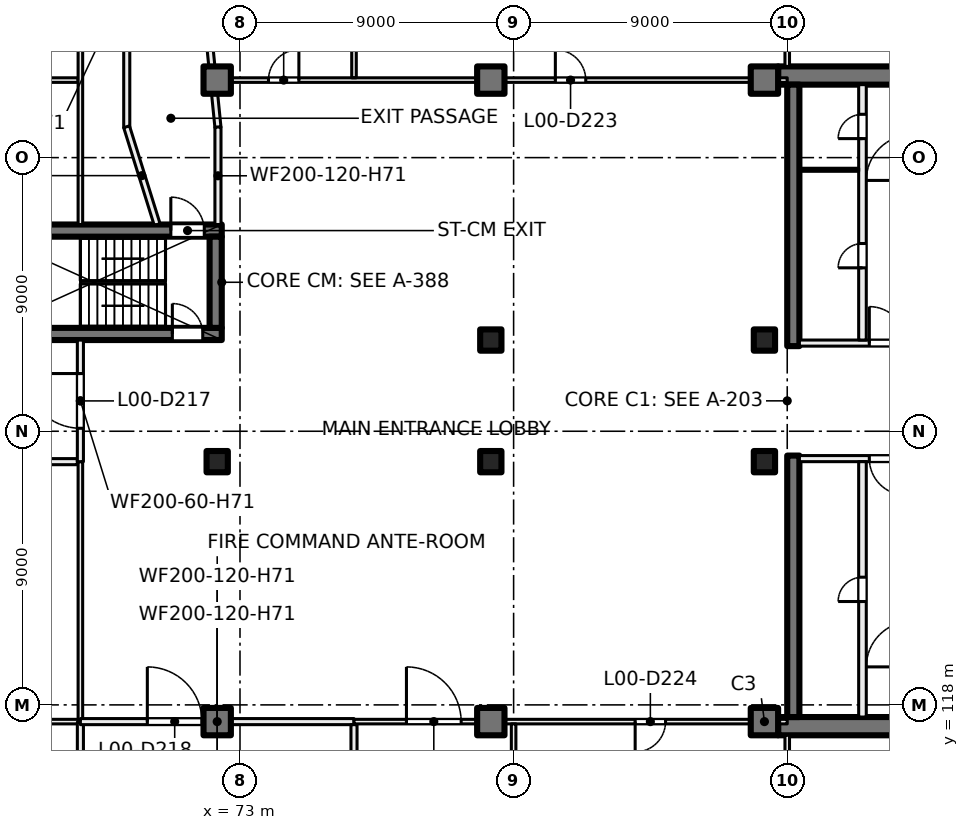
"""IFC4 building model, lengths in metres.
Left out: names, types, materials, properties, quantities, classifications, styles, units other than length and angle.
Written with IfcOpenShell. Run it as: python <this file> out.ifc"""

import sys

from ifc_helpers import new_model, si_unit, direction, frame, frame_2d, origin, origin_2d, place, context, subcontext, project, spatial, rectangle, extrude, element, fill, save


model = new_model("IFC4")
c1 = context("Model", 3, precision=1e-05, world=origin(), true_north=direction((0.0, 1.0)))
c2 = subcontext(c1, "Body", "Model", "MODEL_VIEW")
j1 = project(units=[si_unit("LENGTHUNIT", "METRE"), si_unit("PLANEANGLEUNIT", "RADIAN")], contexts=[c1])
p1 = place(None, origin())
s1 = spatial("IfcSite", under=j1, at=p1, CompositionType="ELEMENT")
p2 = place(p1, origin())
s2 = spatial("IfcBuilding", under=s1, at=p2, CompositionType="ELEMENT")
p3 = place(p2, origin())
s3 = spatial("IfcBuildingStorey", under=s2, at=p3, CompositionType="ELEMENT", Elevation=0.0)
for number, where, z_axis, x_axis in (
    (1, (81.25, 130.0, 0.0), (0.0, 0.0, 1.0), (1.0, 0.0, 0.0)),
    (2, (90.25, 130.0, 0.0), (0.0, 0.0, 1.0), (1.0, 0.0, 0.0)),
    (3, (72.25, 126.0, 0.0), (0.0, 0.0, 1.0), (1.0, 0.0, 0.0)),
    (4, (81.25, 126.0, 0.0), (0.0, 0.0, 1.0), (1.0, 0.0, 0.0)),
    (5, (90.25, 126.0, 0.0), (0.0, 0.0, 1.0), (1.0, 0.0, 0.0)),
):
    element("IfcColumn", number, at=place(p3, frame(where, z_axis=z_axis, x_axis=x_axis)), inside=s3, PredefinedType="COLUMN", context=c2, shape_type="SweptSolid", body=[
        extrude(rectangle(XDim=0.7, YDim=0.7, at=origin_2d()), origin(), (0.0, 0.0, 1.0), 7.5),
    ])
for number, where, z_axis, x_axis in (
    (6, (72.25, 138.55, 0.0), (0.0, 0.0, 1.0), (1.0, 0.0, 0.0)),
    (7, (81.25, 138.55, 0.0), (0.0, 0.0, 1.0), (1.0, 0.0, 0.0)),
    (8, (90.25, 138.55, 0.0), (0.0, 0.0, 1.0), (1.0, 0.0, 0.0)),
    (9, (72.25, 117.45, 0.0), (0.0, 0.0, 1.0), (1.0, 0.0, 0.0)),
    (10, (81.25, 117.45, 0.0), (0.0, 0.0, 1.0), (1.0, 0.0, 0.0)),
    (11, (90.25, 117.45, 0.0), (0.0, 0.0, 1.0), (1.0, 0.0, 0.0)),
):
    element("IfcColumn", number, at=place(p3, frame(where, z_axis=z_axis, x_axis=x_axis)), inside=s3, PredefinedType="COLUMN", context=c2, shape_type="SweptSolid", body=[
        extrude(rectangle(XDim=0.9, YDim=0.9, at=origin_2d()), origin(), (0.0, 0.0, 1.0), 7.5),
    ])
for number, where, z_axis, x_axis in (
    (12, (99.6, 138.7, 0.0), (0.0, 0.0, 1.0), (-1.0, 0.0, 0.0)),
    (13, (99.6, 117.3, 0.0), (0.0, 0.0, 1.0), (-1.0, 0.0, 0.0)),
):
    element("IfcWall", number, at=place(p3, frame(where, z_axis=z_axis, x_axis=x_axis)), inside=s3, PredefinedType="SHEAR", context=c2, shape_type="SweptSolid", body=[
        extrude(rectangle(XDim=8.9, YDim=0.6, at=frame_2d((4.45, 0.0))), origin(), (0.0, 0.0, 1.0), 7.5),
    ])
for number, where, z_axis, x_axis in (
    (14, (91.2, 138.4, 0.0), (0.0, 0.0, 1.0), (0.0, -1.0, 0.0)),
    (15, (91.2, 126.2, 0.0), (0.0, 0.0, 1.0), (0.0, -1.0, 0.0)),
):
    element("IfcWall", number, at=place(p3, frame(where, z_axis=z_axis, x_axis=x_axis)), inside=s3, PredefinedType="SHEAR", context=c2, shape_type="SweptSolid", body=[
        extrude(rectangle(XDim=8.6, YDim=0.4, at=frame_2d((4.3, 0.0))), origin(), (0.0, 0.0, 1.0), 7.5),
    ])
p4 = place(p3, frame((63.6, 130.2, 0.0), z_axis=(0.0, 0.0, 1.0), x_axis=(1.0, 0.0, 0.0)))
e16 = element("IfcWall", 16, at=p4, inside=s3, PredefinedType="SHEAR", context=c2, shape_type="SweptSolid", body=[
    extrude(rectangle(XDim=8.8, YDim=0.4, at=frame_2d((4.4, 0.0))), origin(), (0.0, 0.0, 1.0), 7.5),
])
p5 = place(p4, frame((7.175, 0.0, 0.0)))
e17 = element("IfcOpeningElement", 17, at=p5, cuts=e16, PredefinedType="OPENING", context=c2, shape_type="SweptSolid", body=[
    extrude(rectangle(XDim=1.0, YDim=2.1, at=frame_2d((0.5, 1.05))), frame((0.0, 0.21, 0.0), z_axis=(0.0, -1.0, 0.0), x_axis=(1.0, 0.0, 0.0)), (0.0, 0.0, 1.0), 0.42),
])
p6 = place(p3, frame((64.0, 133.6, 0.0), z_axis=(0.0, 0.0, 1.0), x_axis=(1.0, 0.0, 0.0)))
e18 = element("IfcWall", 18, at=p6, inside=s3, PredefinedType="SHEAR", context=c2, shape_type="SweptSolid", body=[
    extrude(rectangle(XDim=8.4, YDim=0.4, at=frame_2d((4.2, 0.0))), origin(), (0.0, 0.0, 1.0), 7.5),
])
p7 = place(p6, frame((6.725, 0.0, 0.0)))
e19 = element("IfcOpeningElement", 19, at=p7, cuts=e18, PredefinedType="OPENING", context=c2, shape_type="SweptSolid", body=[
    extrude(rectangle(XDim=1.1, YDim=2.1, at=frame_2d((0.55, 1.05))), frame((0.0, 0.21, 0.0), z_axis=(0.0, -1.0, 0.0), x_axis=(1.0, 0.0, 0.0)), (0.0, 0.0, 1.0), 0.42),
])
p8 = place(p3, frame((72.2, 130.4, 0.0), z_axis=(0.0, 0.0, 1.0), x_axis=(0.0, 1.0, 0.0)))
e20 = element("IfcWall", 20, at=p8, inside=s3, PredefinedType="SHEAR", context=c2, shape_type="SweptSolid", body=[
    extrude(rectangle(XDim=3.0, YDim=0.4, at=frame_2d((1.5, 0.0))), origin(), (0.0, 0.0, 1.0), 7.5),
])
p9 = place(p3, frame((95.2, 126.1, 0.0), z_axis=(0.0, 0.0, 1.0), x_axis=(-1.0, 0.0, 0.0)))
e21 = element("IfcWall", 21, at=p9, inside=s3, PredefinedType="PARTITIONING", context=c2, shape_type="SweptSolid", body=[
    extrude(rectangle(XDim=3.8, YDim=0.2, at=frame_2d((1.9, 0.0))), origin(), (0.0, 0.0, 1.0), 7.1),
])
p10 = place(p9, frame((0.3, 0.0, 0.0)))
e22 = element("IfcOpeningElement", 22, at=p10, cuts=e21, PredefinedType="OPENING", context=c2, shape_type="SweptSolid", body=[
    extrude(rectangle(XDim=1.2, YDim=2.1, at=frame_2d((0.6, 1.05))), frame((0.0, 0.11, 0.0), z_axis=(0.0, -1.0, 0.0), x_axis=(1.0, 0.0, 0.0)), (0.0, 0.0, 1.0), 0.22),
])
p11 = place(p3, frame((93.475, 117.6, 0.0), z_axis=(0.0, 0.0, 1.0), x_axis=(0.0, 1.0, 0.0)))
e23 = element("IfcWall", 23, at=p11, inside=s3, PredefinedType="PARTITIONING", context=c2, shape_type="SweptSolid", body=[
    extrude(rectangle(XDim=8.4, YDim=0.25, at=frame_2d((4.2, 0.0))), origin(), (0.0, 0.0, 1.0), 7.1),
])
p12 = place(p11, frame((3.8, 0.0, 0.0)))
e24 = element("IfcOpeningElement", 24, at=p12, cuts=e23, PredefinedType="OPENING", context=c2, shape_type="SweptSolid", body=[
    extrude(rectangle(XDim=0.8, YDim=2.1, at=frame_2d((0.4, 1.05))), frame((0.0, 0.135, 0.0), z_axis=(0.0, -1.0, 0.0), x_axis=(1.0, 0.0, 0.0)), (0.0, 0.0, 1.0), 0.27),
])
p13 = place(p3, frame((91.4, 129.9, 0.0), z_axis=(0.0, 0.0, 1.0), x_axis=(1.0, 0.0, 0.0)))
e25 = element("IfcWall", 25, at=p13, inside=s3, PredefinedType="PARTITIONING", context=c2, shape_type="SweptSolid", body=[
    extrude(rectangle(XDim=3.8, YDim=0.2, at=frame_2d((1.9, 0.0))), origin(), (0.0, 0.0, 1.0), 7.1),
])
p14 = place(p13, frame((2.3, 0.0, 0.0)))
e26 = element("IfcOpeningElement", 26, at=p14, cuts=e25, PredefinedType="OPENING", context=c2, shape_type="SweptSolid", body=[
    extrude(rectangle(XDim=1.2, YDim=2.1, at=frame_2d((0.6, 1.05))), frame((0.0, 0.11, 0.0), z_axis=(0.0, -1.0, 0.0), x_axis=(1.0, 0.0, 0.0)), (0.0, 0.0, 1.0), 0.22),
])
p15 = place(p3, frame((93.475, 130.0, 0.0), z_axis=(0.0, 0.0, 1.0), x_axis=(0.0, 1.0, 0.0)))
e27 = element("IfcWall", 27, at=p15, inside=s3, PredefinedType="PARTITIONING", context=c2, shape_type="SweptSolid", body=[
    extrude(rectangle(XDim=8.4, YDim=0.25, at=frame_2d((4.2, 0.0))), origin(), (0.0, 0.0, 1.0), 7.1),
])
p16 = place(p15, frame((2.375, 0.0, 0.0)))
e28 = element("IfcOpeningElement", 28, at=p16, cuts=e27, PredefinedType="OPENING", context=c2, shape_type="SweptSolid", body=[
    extrude(rectangle(XDim=0.8, YDim=2.1, at=frame_2d((0.4, 1.05))), frame((0.0, 0.135, 0.0), z_axis=(0.0, -1.0, 0.0), x_axis=(1.0, 0.0, 0.0)), (0.0, 0.0, 1.0), 0.27),
])
p17 = place(p15, frame((6.625, 0.0, 0.0)))
e29 = element("IfcOpeningElement", 29, at=p17, cuts=e27, PredefinedType="OPENING", context=c2, shape_type="SweptSolid", body=[
    extrude(rectangle(XDim=0.8, YDim=2.1, at=frame_2d((0.4, 1.05))), frame((0.0, 0.135, 0.0), z_axis=(0.0, -1.0, 0.0), x_axis=(1.0, 0.0, 0.0)), (0.0, 0.0, 1.0), 0.27),
])
p18 = place(p3, frame((91.4, 135.6, 0.0), z_axis=(0.0, 0.0, 1.0), x_axis=(1.0, 0.0, 0.0)))
e30 = element("IfcWall", 30, at=p18, inside=s3, PredefinedType="PARTITIONING", context=c2, shape_type="SweptSolid", body=[
    extrude(rectangle(XDim=1.95, YDim=0.1, at=frame_2d((0.975, 0.0))), origin(), (0.0, 0.0, 1.0), 7.1),
])
p19 = place(p3, frame((49.825, 117.45, 0.0), z_axis=(0.0, 0.0, 1.0), x_axis=(1.0, 0.0, 0.0)))
e31 = element("IfcWall", 31, at=p19, inside=s3, PredefinedType="PARTITIONING", context=c2, shape_type="SweptSolid", body=[
    extrude(rectangle(XDim=17.925, YDim=0.15, at=frame_2d((8.962, 0.0))), origin(), (0.0, 0.0, 1.0), 7.1),
])
p20 = place(p3, frame((67.65, 126.0, 0.0), z_axis=(0.0, 0.0, 1.0), x_axis=(-1.0, 0.0, 0.0)))
e32 = element("IfcWall", 32, at=p20, inside=s3, PredefinedType="PARTITIONING", context=c2, shape_type="SweptSolid", body=[
    extrude(rectangle(XDim=17.8, YDim=0.2, at=frame_2d((8.9, 0.0))), origin(), (0.0, 0.0, 1.0), 7.1),
])
p21 = place(p20, frame((15.148, 0.0, 0.0)))
e33 = element("IfcOpeningElement", 33, at=p21, cuts=e32, PredefinedType="OPENING", context=c2, shape_type="SweptSolid", body=[
    extrude(rectangle(XDim=1.0, YDim=2.1, at=frame_2d((0.5, 1.05))), frame((0.0, 0.11, 0.0), z_axis=(0.0, -1.0, 0.0), x_axis=(1.0, 0.0, 0.0)), (0.0, 0.0, 1.0), 0.22),
])
p22 = place(p20, frame((6.152, 0.0, 0.0)))
e34 = element("IfcOpeningElement", 34, at=p22, cuts=e32, PredefinedType="OPENING", context=c2, shape_type="SweptSolid", body=[
    extrude(rectangle(XDim=1.0, YDim=2.1, at=frame_2d((0.5, 1.05))), frame((0.0, 0.11, 0.0), z_axis=(0.0, -1.0, 0.0), x_axis=(1.0, 0.0, 0.0)), (0.0, 0.0, 1.0), 0.22),
])
p23 = place(p3, frame((54.325, 138.55, 0.0), z_axis=(0.0, 0.0, 1.0), x_axis=(1.0, 0.0, 0.0)))
e35 = element("IfcWall", 35, at=p23, inside=s3, PredefinedType="PARTITIONING", context=c2, shape_type="SweptSolid", body=[
    extrude(rectangle(XDim=13.35, YDim=0.15, at=frame_2d((6.675, 0.0))), origin(), (0.0, 0.0, 1.0), 7.1),
])
p24 = place(p3, frame((67.75, 109.15, 0.0), z_axis=(0.0, 0.0, 1.0), x_axis=(0.0, 1.0, 0.0)))
e36 = element("IfcWall", 36, at=p24, inside=s3, PredefinedType="PARTITIONING", context=c2, shape_type="SweptSolid", body=[
    extrude(rectangle(XDim=8.28, YDim=0.2, at=frame_2d((4.14, 0.0))), origin(), (0.0, 0.0, 1.0), 7.1),
])
p25 = place(p3, frame((67.75, 117.45, 0.0), z_axis=(0.0, 0.0, 1.0), x_axis=(0.0, 1.0, 0.0)))
e37 = element("IfcWall", 37, at=p25, inside=s3, PredefinedType="PARTITIONING", context=c2, shape_type="SweptSolid", body=[
    extrude(rectangle(XDim=8.55, YDim=0.15, at=frame_2d((4.275, 0.0))), origin(), (0.0, 0.0, 1.0), 7.1),
])
p26 = place(p3, frame((67.75, 117.45, 0.0), z_axis=(0.0, 0.0, 1.0), x_axis=(1.0, 0.0, 0.0)))
e38 = element("IfcWall", 38, at=p26, inside=s3, PredefinedType="PARTITIONING", context=c2, shape_type="SweptSolid", body=[
    extrude(rectangle(XDim=9.0, YDim=0.2, at=frame_2d((4.5, 0.0))), origin(), (0.0, 0.0, 1.0), 7.1),
])
p27 = place(p26, frame((2.202, 0.0, 0.0)))
e39 = element("IfcOpeningElement", 39, at=p27, cuts=e38, PredefinedType="OPENING", context=c2, shape_type="SweptSolid", body=[
    extrude(rectangle(XDim=1.8, YDim=2.1, at=frame_2d((0.9, 1.05))), frame((0.0, 0.11, 0.0), z_axis=(0.0, -1.0, 0.0), x_axis=(1.0, 0.0, 0.0)), (0.0, 0.0, 1.0), 0.22),
])
p28 = place(p3, frame((67.75, 130.0, 0.0), z_axis=(0.0, 0.0, 1.0), x_axis=(0.0, -1.0, 0.0)))
e40 = element("IfcWall", 40, at=p28, inside=s3, PredefinedType="PARTITIONING", context=c2, shape_type="SweptSolid", body=[
    extrude(rectangle(XDim=4.0, YDim=0.2, at=frame_2d((2.0, 0.0))), origin(), (0.0, 0.0, 1.0), 7.1),
])
p29 = place(p28, frame((1.102, 0.0, 0.0)))
e41 = element("IfcOpeningElement", 41, at=p29, cuts=e40, PredefinedType="OPENING", context=c2, shape_type="SweptSolid", body=[
    extrude(rectangle(XDim=1.8, YDim=2.1, at=frame_2d((0.9, 1.05))), frame((0.0, 0.11, 0.0), z_axis=(0.0, -1.0, 0.0), x_axis=(1.0, 0.0, 0.0)), (0.0, 0.0, 1.0), 0.22),
])
p30 = place(p3, frame((67.75, 133.8, 0.0), z_axis=(0.0, 0.0, 1.0), x_axis=(0.0, 1.0, 0.0)))
e42 = element("IfcWall", 42, at=p30, inside=s3, PredefinedType="PARTITIONING", context=c2, shape_type="SweptSolid", body=[
    extrude(rectangle(XDim=12.6, YDim=0.15, at=frame_2d((6.3, 0.0))), origin(), (0.0, 0.0, 1.0), 7.1),
])
p31 = place(p3, frame((69.275, 136.985, 0.0), z_axis=(0.0, 0.0, 1.0), x_axis=(0.0, 1.0, 0.0)))
e43 = element("IfcWall", 43, at=p31, inside=s3, PredefinedType="PARTITIONING", context=c2, shape_type="SweptSolid", body=[
    extrude(rectangle(XDim=9.415, YDim=0.2, at=frame_2d((4.708, 0.0))), origin(), (0.0, 0.0, 1.0), 7.1),
])
p32 = place(p3, frame((69.27, 137.015, 0.0), z_axis=(0.0, 0.0, 1.0), x_axis=(0.298341026978, -0.954459339952, 0.0)))
e44 = element("IfcWall", 44, at=p32, inside=s3, PredefinedType="PARTITIONING", context=c2, shape_type="SweptSolid", body=[
    extrude(rectangle(XDim=3.368, YDim=0.2, at=frame_2d((1.684, 0.0))), origin(), (0.0, 0.0, 1.0), 7.1),
])
p33 = place(p3, frame((71.335, 146.4, 0.0), z_axis=(0.0, 0.0, 1.0), x_axis=(0.09944745439, -0.995042815066, 0.0)))
e45 = element("IfcWall", 45, at=p33, inside=s3, PredefinedType="PARTITIONING", context=c2, shape_type="SweptSolid", body=[
    extrude(rectangle(XDim=9.452, YDim=0.2, at=frame_2d((4.726, 0.0))), origin(), (0.0, 0.0, 1.0), 7.1),
])
p34 = place(p3, frame((72.22, 138.55, 0.0), z_axis=(0.0, 0.0, 1.0), x_axis=(1.0, 0.0, 0.0)))
e46 = element("IfcWall", 46, at=p34, inside=s3, PredefinedType="PARTITIONING", context=c2, shape_type="SweptSolid", body=[
    extrude(rectangle(XDim=18.78, YDim=0.15, at=frame_2d((9.39, 0.0))), origin(), (0.0, 0.0, 1.0), 7.1),
])
p35 = place(p34, frame((1.717, 0.0, 0.0)))
e47 = element("IfcOpeningElement", 47, at=p35, cuts=e46, PredefinedType="OPENING", context=c2, shape_type="SweptSolid", body=[
    extrude(rectangle(XDim=1.0, YDim=2.1, at=frame_2d((0.5, 1.05))), frame((0.0, 0.085, 0.0), z_axis=(0.0, -1.0, 0.0), x_axis=(1.0, 0.0, 0.0)), (0.0, 0.0, 1.0), 0.17),
])
p36 = place(p34, frame((11.153, 0.0, 0.0)))
e48 = element("IfcOpeningElement", 48, at=p36, cuts=e46, PredefinedType="OPENING", context=c2, shape_type="SweptSolid", body=[
    extrude(rectangle(XDim=1.0, YDim=2.1, at=frame_2d((0.5, 1.05))), frame((0.0, 0.085, 0.0), z_axis=(0.0, -1.0, 0.0), x_axis=(1.0, 0.0, 0.0)), (0.0, 0.0, 1.0), 0.17),
])
p37 = place(p3, frame((72.275, 133.8, 0.0), z_axis=(0.0, 0.0, 1.0), x_axis=(0.0, 1.0, 0.0)))
e49 = element("IfcWall", 49, at=p37, inside=s3, PredefinedType="PARTITIONING", context=c2, shape_type="SweptSolid", body=[
    extrude(rectangle(XDim=3.205, YDim=0.2, at=frame_2d((1.603, 0.0))), origin(), (0.0, 0.0, 1.0), 7.1),
])
p38 = place(p3, frame((76.75, 109.15, 0.0), z_axis=(0.0, 0.0, 1.0), x_axis=(0.0, 1.0, 0.0)))
e50 = element("IfcWall", 50, at=p38, inside=s3, PredefinedType="PARTITIONING", context=c2, shape_type="SweptSolid", body=[
    extrude(rectangle(XDim=8.2, YDim=0.2, at=frame_2d((4.1, 0.0))), origin(), (0.0, 0.0, 1.0), 7.1),
])
p39 = place(p3, frame((76.75, 117.45, 0.0), z_axis=(0.0, 0.0, 1.0), x_axis=(1.0, 0.0, 0.0)))
e51 = element("IfcWall", 51, at=p39, inside=s3, PredefinedType="PARTITIONING", context=c2, shape_type="SweptSolid", body=[
    extrude(rectangle(XDim=14.25, YDim=0.15, at=frame_2d((7.125, 0.0))), origin(), (0.0, 0.0, 1.0), 7.1),
])
p40 = place(p39, frame((1.725, 0.0, 0.0)))
e52 = element("IfcOpeningElement", 52, at=p40, cuts=e51, PredefinedType="OPENING", context=c2, shape_type="SweptSolid", body=[
    extrude(rectangle(XDim=1.8, YDim=2.1, at=frame_2d((0.9, 1.05))), frame((0.0, 0.085, 0.0), z_axis=(0.0, -1.0, 0.0), x_axis=(1.0, 0.0, 0.0)), (0.0, 0.0, 1.0), 0.17),
])
p41 = place(p39, frame((9.248, 0.0, 0.0)))
e53 = element("IfcOpeningElement", 53, at=p41, cuts=e51, PredefinedType="OPENING", context=c2, shape_type="SweptSolid", body=[
    extrude(rectangle(XDim=1.0, YDim=2.1, at=frame_2d((0.5, 1.05))), frame((0.0, 0.085, 0.0), z_axis=(0.0, -1.0, 0.0), x_axis=(1.0, 0.0, 0.0)), (0.0, 0.0, 1.0), 0.17),
])
p42 = place(p3, frame((76.75, 138.625, 0.0), z_axis=(0.0, 0.0, 1.0), x_axis=(0.0, 1.0, 0.0)))
e54 = element("IfcWall", 54, at=p42, inside=s3, PredefinedType="PARTITIONING", context=c2, shape_type="SweptSolid", body=[
    extrude(rectangle(XDim=7.775, YDim=0.15, at=frame_2d((3.887, 0.0))), origin(), (0.0, 0.0, 1.0), 7.1),
])
p43 = place(p3, frame((82.0, 109.15, 0.0), z_axis=(0.0, 0.0, 1.0), x_axis=(0.0, 1.0, 0.0)))
e55 = element("IfcWall", 55, at=p43, inside=s3, PredefinedType="PARTITIONING", context=c2, shape_type="SweptSolid", body=[
    extrude(rectangle(XDim=8.225, YDim=0.15, at=frame_2d((4.113, 0.0))), origin(), (0.0, 0.0, 1.0), 7.1),
])
p44 = place(p3, frame((91.0, 109.15, 0.0), z_axis=(0.0, 0.0, 1.0), x_axis=(0.0, 1.0, 0.0)))
e56 = element("IfcWall", 56, at=p44, inside=s3, PredefinedType="PARTITIONING", context=c2, shape_type="SweptSolid", body=[
    extrude(rectangle(XDim=7.85, YDim=0.15, at=frame_2d((3.925, 0.0))), origin(), (0.0, 0.0, 1.0), 7.1),
])
p45 = place(p3, frame((91.0, 139.0, 0.0), z_axis=(0.0, 0.0, 1.0), x_axis=(0.0, 1.0, 0.0)))
e57 = element("IfcWall", 57, at=p45, inside=s3, PredefinedType="PARTITIONING", context=c2, shape_type="SweptSolid", body=[
    extrude(rectangle(XDim=7.4, YDim=0.15, at=frame_2d((3.7, 0.0))), origin(), (0.0, 0.0, 1.0), 7.1),
])
p46 = place(p10, origin())
e58 = element("IfcDoor", 58, at=p46, inside=s3, OperationType="DOUBLE_DOOR_SINGLE_SWING", PredefinedType="DOOR", context=c2, shape_type="SweptSolid", body=[
    extrude(rectangle(XDim=1.2, YDim=2.1, at=frame_2d((0.6, 1.05))), frame((0.0, 0.025, 0.0), z_axis=(0.0, -1.0, 0.0), x_axis=(1.0, 0.0, 0.0)), (0.0, 0.0, 1.0), 0.05),
])
fill(e22, e58)
p47 = place(p12, origin())
e59 = element("IfcDoor", 59, at=p47, inside=s3, OperationType="SINGLE_SWING_LEFT", PredefinedType="DOOR", context=c2, shape_type="SweptSolid", body=[
    extrude(rectangle(XDim=0.8, YDim=2.1, at=frame_2d((0.4, 1.05))), frame((0.0, 0.025, 0.0), z_axis=(0.0, -1.0, 0.0), x_axis=(1.0, 0.0, 0.0)), (0.0, 0.0, 1.0), 0.05),
])
fill(e24, e59)
p48 = place(p14, origin())
e60 = element("IfcDoor", 60, at=p48, inside=s3, OperationType="DOUBLE_DOOR_SINGLE_SWING", PredefinedType="DOOR", context=c2, shape_type="SweptSolid", body=[
    extrude(rectangle(XDim=1.2, YDim=2.1, at=frame_2d((0.6, 1.05))), frame((0.0, 0.025, 0.0), z_axis=(0.0, -1.0, 0.0), x_axis=(1.0, 0.0, 0.0)), (0.0, 0.0, 1.0), 0.05),
])
fill(e26, e60)
p49 = place(p16, origin())
e61 = element("IfcDoor", 61, at=p49, inside=s3, OperationType="SINGLE_SWING_RIGHT", PredefinedType="DOOR", context=c2, shape_type="SweptSolid", body=[
    extrude(rectangle(XDim=0.8, YDim=2.1, at=frame_2d((0.4, 1.05))), frame((0.0, 0.025, 0.0), z_axis=(0.0, -1.0, 0.0), x_axis=(1.0, 0.0, 0.0)), (0.0, 0.0, 1.0), 0.05),
])
fill(e28, e61)
p50 = place(p17, origin())
e62 = element("IfcDoor", 62, at=p50, inside=s3, OperationType="SINGLE_SWING_LEFT", PredefinedType="DOOR", context=c2, shape_type="SweptSolid", body=[
    extrude(rectangle(XDim=0.8, YDim=2.1, at=frame_2d((0.4, 1.05))), frame((0.0, 0.025, 0.0), z_axis=(0.0, -1.0, 0.0), x_axis=(1.0, 0.0, 0.0)), (0.0, 0.0, 1.0), 0.05),
])
fill(e29, e62)
p51 = place(p5, origin())
e63 = element("IfcDoor", 63, at=p51, inside=s3, OperationType="SINGLE_SWING_LEFT", PredefinedType="DOOR", context=c2, shape_type="SweptSolid", body=[
    extrude(rectangle(XDim=1.0, YDim=2.1, at=frame_2d((0.5, 1.05))), frame((0.0, 0.025, 0.0), z_axis=(0.0, -1.0, 0.0), x_axis=(1.0, 0.0, 0.0)), (0.0, 0.0, 1.0), 0.05),
])
fill(e17, e63)
p52 = place(p7, origin())
e64 = element("IfcDoor", 64, at=p52, inside=s3, OperationType="SINGLE_SWING_LEFT", PredefinedType="DOOR", context=c2, shape_type="SweptSolid", body=[
    extrude(rectangle(XDim=1.1, YDim=2.1, at=frame_2d((0.55, 1.05))), frame((0.0, 0.025, 0.0), z_axis=(0.0, -1.0, 0.0), x_axis=(1.0, 0.0, 0.0)), (0.0, 0.0, 1.0), 0.05),
])
fill(e19, e64)
p53 = place(p29, origin())
e65 = element("IfcDoor", 65, at=p53, inside=s3, OperationType="DOUBLE_DOOR_SINGLE_SWING", PredefinedType="DOOR", context=c2, shape_type="SweptSolid", body=[
    extrude(rectangle(XDim=1.8, YDim=2.1, at=frame_2d((0.9, 1.05))), frame((0.0, 0.025, 0.0), z_axis=(0.0, -1.0, 0.0), x_axis=(1.0, 0.0, 0.0)), (0.0, 0.0, 1.0), 0.05),
])
fill(e41, e65)
p54 = place(p27, origin())
e66 = element("IfcDoor", 66, at=p54, inside=s3, OperationType="DOUBLE_DOOR_SINGLE_SWING", PredefinedType="DOOR", context=c2, shape_type="SweptSolid", body=[
    extrude(rectangle(XDim=1.8, YDim=2.1, at=frame_2d((0.9, 1.05))), frame((0.0, 0.025, 0.0), z_axis=(0.0, -1.0, 0.0), x_axis=(1.0, 0.0, 0.0)), (0.0, 0.0, 1.0), 0.05),
])
fill(e39, e66)
p55 = place(p35, origin())
e67 = element("IfcDoor", 67, at=p55, inside=s3, OperationType="SINGLE_SWING_RIGHT", PredefinedType="DOOR", context=c2, shape_type="SweptSolid", body=[
    extrude(rectangle(XDim=1.0, YDim=2.1, at=frame_2d((0.5, 1.05))), frame((0.0, 0.025, 0.0), z_axis=(0.0, -1.0, 0.0), x_axis=(1.0, 0.0, 0.0)), (0.0, 0.0, 1.0), 0.05),
])
fill(e47, e67)
p56 = place(p40, origin())
e68 = element("IfcDoor", 68, at=p56, inside=s3, OperationType="DOUBLE_DOOR_SINGLE_SWING", PredefinedType="DOOR", context=c2, shape_type="SweptSolid", body=[
    extrude(rectangle(XDim=1.8, YDim=2.1, at=frame_2d((0.9, 1.05))), frame((0.0, 0.025, 0.0), z_axis=(0.0, -1.0, 0.0), x_axis=(1.0, 0.0, 0.0)), (0.0, 0.0, 1.0), 0.05),
])
fill(e52, e68)
p57 = place(p36, origin())
e69 = element("IfcDoor", 69, at=p57, inside=s3, OperationType="SINGLE_SWING_LEFT", PredefinedType="DOOR", context=c2, shape_type="SweptSolid", body=[
    extrude(rectangle(XDim=1.0, YDim=2.1, at=frame_2d((0.5, 1.05))), frame((0.0, 0.025, 0.0), z_axis=(0.0, -1.0, 0.0), x_axis=(1.0, 0.0, 0.0)), (0.0, 0.0, 1.0), 0.05),
])
fill(e48, e69)
p58 = place(p41, origin())
e70 = element("IfcDoor", 70, at=p58, inside=s3, OperationType="SINGLE_SWING_LEFT", PredefinedType="DOOR", context=c2, shape_type="SweptSolid", body=[
    extrude(rectangle(XDim=1.0, YDim=2.1, at=frame_2d((0.5, 1.05))), frame((0.0, 0.025, 0.0), z_axis=(0.0, -1.0, 0.0), x_axis=(1.0, 0.0, 0.0)), (0.0, 0.0, 1.0), 0.05),
])
fill(e53, e70)
save(model, sys.argv[1])
